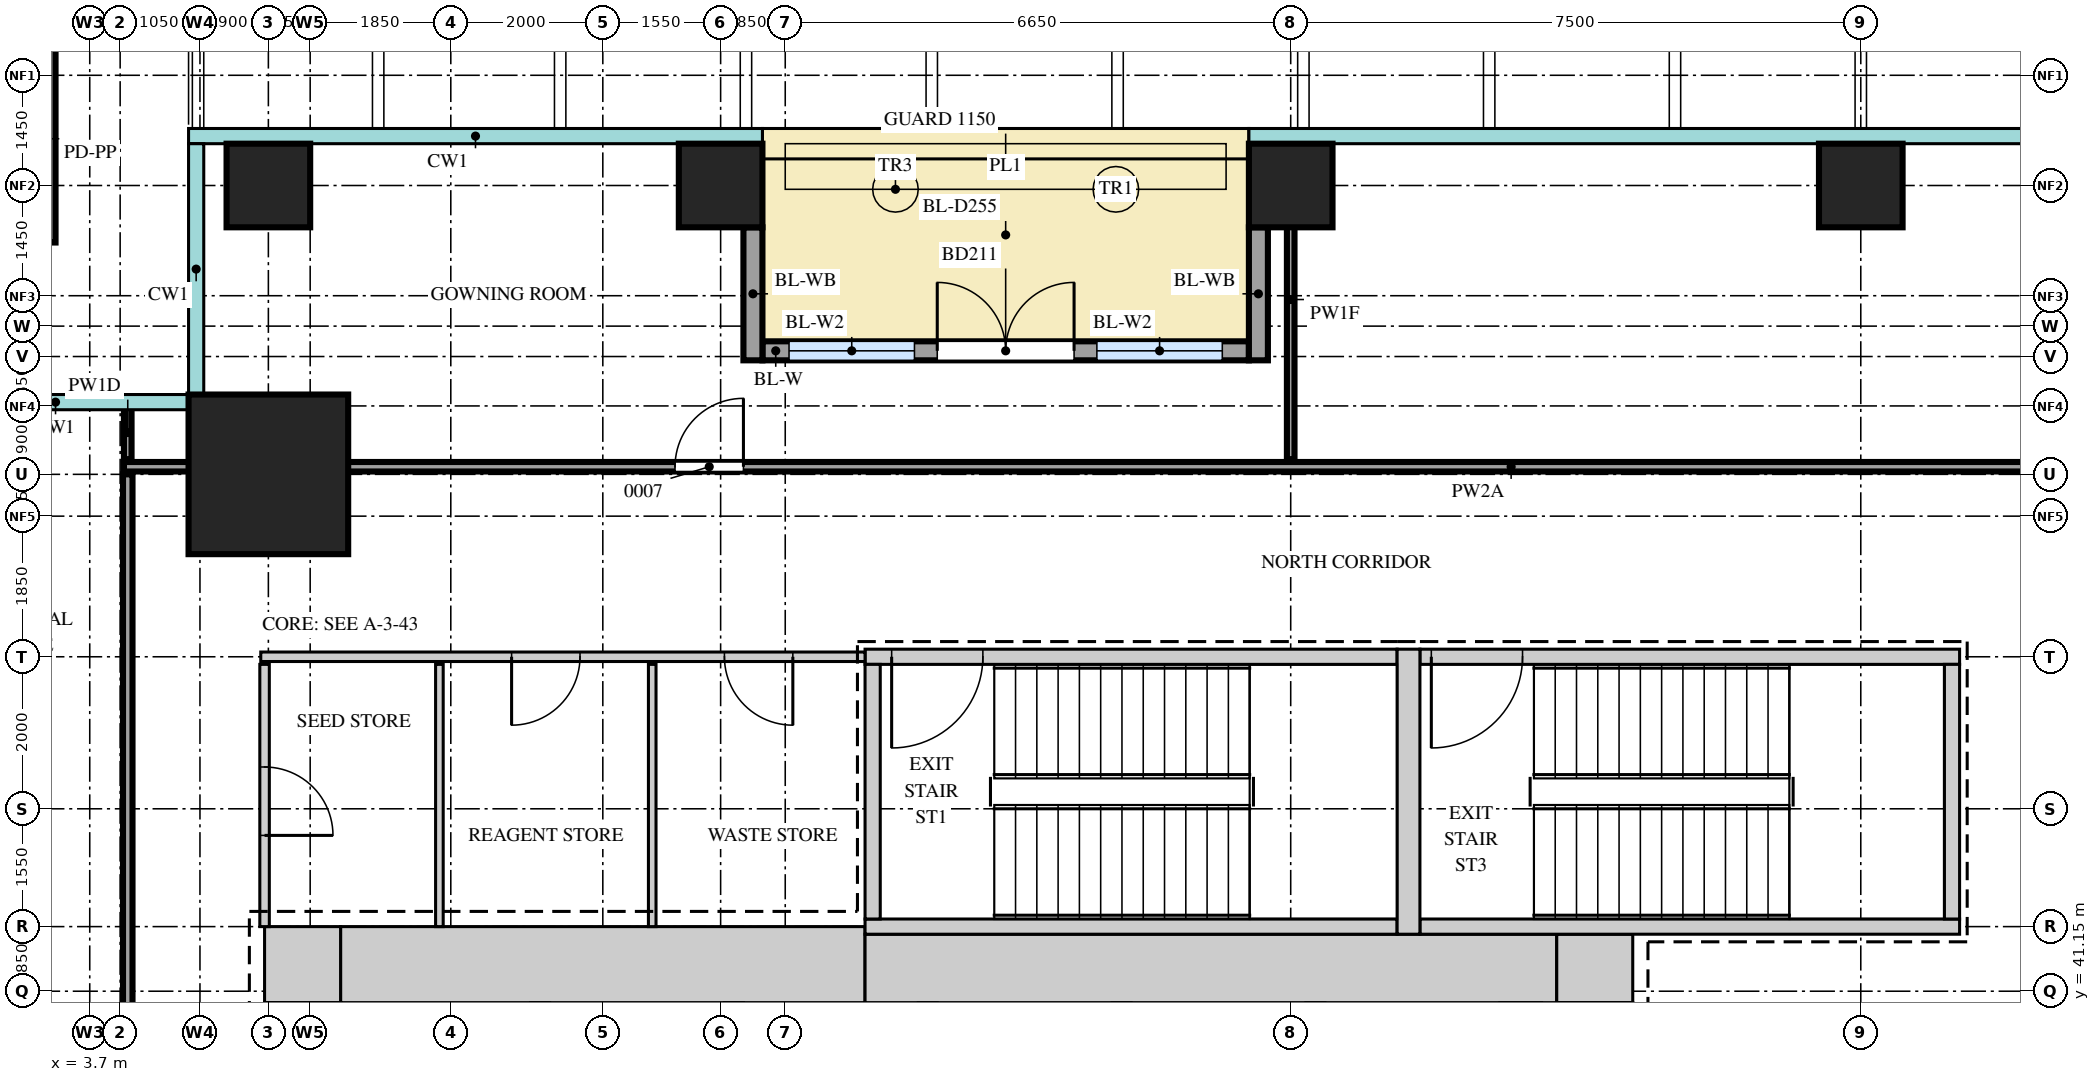
"""IFC4 building model, lengths in metres.
Left out: names, types, materials, properties, quantities, classifications, styles, units other than length and angle.
Written with IfcOpenShell. Run it as: python <this file> out.ifc"""

import sys

from ifc_helpers import new_model, si_unit, direction, frame, frame_2d, origin, origin_2d, place, context, subcontext, project, spatial, rectangle, extrude, source, transform, mapped, element, fill, save


model = new_model("IFC4")
c1 = context("Model", 3, precision=1e-05, world=origin(), true_north=direction((0.0, 1.0)))
c2 = subcontext(c1, "Body", "Model", "MODEL_VIEW")
j1 = project(units=[si_unit("LENGTHUNIT", "METRE"), si_unit("PLANEANGLEUNIT", "RADIAN")], contexts=[c1])
p1 = place(None, origin())
s1 = spatial("IfcSite", under=j1, at=p1, CompositionType="ELEMENT")
p2 = place(p1, origin())
s2 = spatial("IfcBuilding", under=s1, at=p2, CompositionType="ELEMENT")
p3 = place(p2, frame((0.0, 0.0, 101.5)))
s3 = spatial("IfcBuildingStorey", under=s2, at=p3, CompositionType="ELEMENT", Elevation=101.5)
m1 = source(origin(), c2, "Body", "SweptSolid", [
    extrude(rectangle(XDim=6.9, YDim=1.0, at=frame_2d((3.45, 0.0))), origin(), (0.0, 0.0, 1.0), 4.1),
])
p4 = place(p3, frame((7.0, 41.5, 0.0), z_axis=(0.0, 0.0, 1.0), x_axis=(1.0, 0.0, 0.0)))
e1 = element("IfcWall", 1, at=p4, inside=s3, PredefinedType="SHEAR", context=c2, shape_type="MappedRepresentation", body=[
    mapped(m1, transform((0.0, 0.0, 0.0))),
])
m2 = source(origin(), c2, "Body", "SweptSolid", [
    extrude(rectangle(XDim=9.1, YDim=0.9, at=frame_2d((4.55, 0.0))), origin(), (0.0, 0.0, 1.0), 4.1),
])
p5 = place(p3, frame((13.9, 41.45, 0.0), z_axis=(0.0, 0.0, 1.0), x_axis=(1.0, 0.0, 0.0)))
e2 = element("IfcWall", 2, at=p5, inside=s3, PredefinedType="SHEAR", context=c2, shape_type="MappedRepresentation", body=[
    mapped(m2, transform((0.0, 0.0, 0.0))),
])
m3 = source(origin(), c2, "Body", "SweptSolid", [
    extrude(rectangle(XDim=1.0, YDim=0.9, at=frame_2d((0.5, 0.0))), origin(), (0.0, 0.0, 1.0), 4.1),
])
p6 = place(p3, frame((23.0, 41.45, 0.0), z_axis=(0.0, 0.0, 1.0), x_axis=(1.0, 0.0, 0.0)))
e3 = element("IfcWall", 3, at=p6, inside=s3, PredefinedType="SHEAR", context=c2, shape_type="MappedRepresentation", body=[
    mapped(m3, transform((0.0, 0.0, 0.0))),
])
m4 = source(origin(), c2, "Body", "SweptSolid", [
    extrude(rectangle(XDim=1.0, YDim=1.0, at=frame_2d((0.5, 0.0))), origin(), (0.0, 0.0, 1.0), 4.1),
])
p7 = place(p3, frame((6.0, 41.5, 0.0), z_axis=(0.0, 0.0, 1.0), x_axis=(1.0, 0.0, 0.0)))
e4 = element("IfcWall", 4, at=p7, inside=s3, PredefinedType="SHEAR", context=c2, shape_type="MappedRepresentation", body=[
    mapped(m4, transform((0.0, 0.0, 0.0))),
])
m5 = source(origin(), c2, "Body", "SweptSolid", [
    extrude(rectangle(XDim=7.0, YDim=0.2, at=frame_2d((3.5, 0.0))), origin(), (0.0, 0.0, 1.0), 4.1),
])
p8 = place(p3, frame((13.9, 45.55, 0.0), z_axis=(0.0, 0.0, 1.0), x_axis=(1.0, 0.0, 0.0)))
e5 = element("IfcWall", 5, at=p8, inside=s3, PredefinedType="SHEAR", context=c2, shape_type="MappedRepresentation", body=[
    mapped(m5, transform((0.0, 0.0, 0.0))),
])
m6 = source(origin(), c2, "Body", "SweptSolid", [
    extrude(rectangle(XDim=1.2, YDim=2.1, at=frame_2d((0.6, 1.05))), frame((0.0, 0.11, 0.0), z_axis=(0.0, -1.0, 0.0), x_axis=(1.0, 0.0, 0.0)), (0.0, 0.0, 1.0), 0.22),
])
p9 = place(p8, frame((0.35, 0.0, 0.0)))
e6 = element("IfcOpeningElement", 6, at=p9, cuts=e5, PredefinedType="OPENING", context=c2, shape_type="MappedRepresentation", body=[
    mapped(m6, transform((0.0, 0.0, 0.0))),
])
p10 = place(p3, frame((13.9, 42.0, 0.0), z_axis=(0.0, 0.0, 1.0), x_axis=(1.0, 0.0, 0.0)))
e7 = element("IfcWall", 7, at=p10, inside=s3, PredefinedType="SHEAR", context=c2, shape_type="MappedRepresentation", body=[
    mapped(m5, transform((0.0, 0.0, 0.0))),
])
m7 = source(origin(), c2, "Body", "SweptSolid", [
    extrude(rectangle(XDim=7.1, YDim=0.2, at=frame_2d((3.55, 0.0))), origin(), (0.0, 0.0, 1.0), 4.1),
])
p11 = place(p3, frame((21.2, 45.55, 0.0), z_axis=(0.0, 0.0, 1.0), x_axis=(1.0, 0.0, 0.0)))
e8 = element("IfcWall", 8, at=p11, inside=s3, PredefinedType="SHEAR", context=c2, shape_type="MappedRepresentation", body=[
    mapped(m7, transform((0.0, 0.0, 0.0))),
])
p12 = place(p11, frame((0.15, 0.0, 0.0)))
e9 = element("IfcOpeningElement", 9, at=p12, cuts=e8, PredefinedType="OPENING", context=c2, shape_type="MappedRepresentation", body=[
    mapped(m6, transform((0.0, 0.0, 0.0))),
])
p13 = place(p3, frame((21.2, 42.0, 0.0), z_axis=(0.0, 0.0, 1.0), x_axis=(1.0, 0.0, 0.0)))
e10 = element("IfcWall", 10, at=p13, inside=s3, PredefinedType="SHEAR", context=c2, shape_type="MappedRepresentation", body=[
    mapped(m7, transform((0.0, 0.0, 0.0))),
])
m8 = source(origin(), c2, "Body", "SweptSolid", [
    extrude(rectangle(XDim=3.75, YDim=0.3, at=frame_2d((1.875, 0.0))), origin(), (0.0, 0.0, 1.0), 4.1),
])
p14 = place(p3, frame((21.05, 41.9, 0.0), z_axis=(0.0, 0.0, 1.0), x_axis=(0.0, 1.0, 0.0)))
e11 = element("IfcWall", 11, at=p14, inside=s3, PredefinedType="SHEAR", context=c2, shape_type="MappedRepresentation", body=[
    mapped(m8, transform((0.0, 0.0, 0.0))),
])
m9 = source(origin(), c2, "Body", "SweptSolid", [
    extrude(rectangle(XDim=3.35, YDim=0.2, at=frame_2d((1.675, 0.0))), origin(), (0.0, 0.0, 1.0), 4.1),
])
for number, where, z_axis, x_axis in (
    (12, (14.0, 42.1, 0.0), (0.0, 0.0, 1.0), (0.0, 1.0, 0.0)),
    (13, (28.2, 42.1, 0.0), (0.0, 0.0, 1.0), (0.0, 1.0, 0.0)),
):
    element("IfcWall", number, at=place(p3, frame(where, z_axis=z_axis, x_axis=x_axis)), inside=s3, PredefinedType="SHEAR", context=c2, shape_type="MappedRepresentation", body=[
        mapped(m9, transform((0.0, 0.0, 0.0))),
    ])
m10 = source(origin(), c2, "Body", "SweptSolid", [
    extrude(rectangle(XDim=2.1, YDim=2.1, at=origin_2d()), origin(), (0.0, 0.0, 1.0), 4.4),
])
p15 = place(p3, frame((6.05, 47.95, 0.0), z_axis=(0.0, 0.0, 1.0), x_axis=(1.0, 0.0, 0.0)))
e14 = element("IfcColumn", 14, at=p15, inside=s3, PredefinedType="COLUMN", context=c2, shape_type="MappedRepresentation", body=[
    mapped(m10, transform((0.0, 0.0, 0.0))),
])
m11 = source(origin(), c2, "Body", "SweptSolid", [
    extrude(rectangle(XDim=1.1, YDim=1.1, at=origin_2d()), origin(), (0.0, 0.0, 1.0), 4.1),
])
for number, where, z_axis, x_axis in (
    (15, (6.05, 51.75, 0.0), (0.0, 0.0, 1.0), (1.0, 0.0, 0.0)),
    (16, (12.0, 51.75, 0.0), (0.0, 0.0, 1.0), (1.0, 0.0, 0.0)),
    (17, (19.5, 51.75, 0.0), (0.0, 0.0, 1.0), (1.0, 0.0, 0.0)),
    (18, (27.0, 51.75, 0.0), (0.0, 0.0, 1.0), (1.0, 0.0, 0.0)),
):
    element("IfcColumn", number, at=place(p3, frame(where, z_axis=z_axis, x_axis=x_axis)), inside=s3, PredefinedType="COLUMN", context=c2, shape_type="MappedRepresentation", body=[
        mapped(m11, transform((0.0, 0.0, 0.0))),
    ])
m12 = source(origin(), c2, "Body", "SweptSolid", [
    extrude(rectangle(XDim=6.4, YDim=0.25, at=frame_2d((3.2, 0.0))), origin(), (0.0, 0.0, 1.0), 4.1),
])
p16 = place(p3, frame((12.55, 49.575, 0.0), z_axis=(0.0, 0.0, 1.0), x_axis=(1.0, 0.0, 0.0)))
e19 = element("IfcWall", 19, at=p16, inside=s3, PredefinedType="SOLIDWALL", context=c2, shape_type="MappedRepresentation", body=[
    mapped(m12, transform((0.0, 0.0, 0.0))),
])
m13 = source(origin(), c2, "Body", "SweptSolid", [
    extrude(rectangle(XDim=1.65, YDim=2.4, at=frame_2d((0.825, 1.2))), frame((0.0, 0.135, 0.0), z_axis=(0.0, -1.0, 0.0), x_axis=(1.0, 0.0, 0.0)), (0.0, 0.0, 1.0), 0.27),
])
p17 = place(p16, frame((0.35, 0.0, 0.0)))
e20 = element("IfcOpeningElement", 20, at=p17, cuts=e19, PredefinedType="OPENING", context=c2, shape_type="MappedRepresentation", body=[
    mapped(m13, transform((0.0, 0.0, 0.0))),
])
p18 = place(p16, frame((4.4, 0.0, 0.0)))
e21 = element("IfcOpeningElement", 21, at=p18, cuts=e19, PredefinedType="OPENING", context=c2, shape_type="MappedRepresentation", body=[
    mapped(m13, transform((0.0, 0.0, 0.0))),
])
m14 = source(origin(), c2, "Body", "SweptSolid", [
    extrude(rectangle(XDim=1.8, YDim=2.4, at=frame_2d((0.9, 1.2))), frame((0.0, 0.135, 0.0), z_axis=(0.0, -1.0, 0.0), x_axis=(1.0, 0.0, 0.0)), (0.0, 0.0, 1.0), 0.27),
])
p19 = place(p16, frame((2.3, 0.0, 0.0)))
e22 = element("IfcOpeningElement", 22, at=p19, cuts=e19, PredefinedType="OPENING", context=c2, shape_type="MappedRepresentation", body=[
    mapped(m14, transform((0.0, 0.0, 0.0))),
])
m15 = source(origin(), c2, "Body", "SweptSolid", [
    extrude(rectangle(XDim=1.75, YDim=0.25, at=frame_2d((0.875, 0.0))), origin(), (0.0, 0.0, 1.0), 3.8),
])
for number, where, z_axis, x_axis in (
    (23, (12.425, 51.2, 0.0), (0.0, 0.0, 1.0), (0.0, -1.0, 0.0)),
    (24, (19.075, 51.2, 0.0), (0.0, 0.0, 1.0), (0.0, -1.0, 0.0)),
):
    element("IfcWall", number, at=place(p3, frame(where, z_axis=z_axis, x_axis=x_axis)), inside=s3, PredefinedType="SOLIDWALL", context=c2, shape_type="MappedRepresentation", body=[
        mapped(m15, transform((0.0, 0.0, 0.0))),
    ])
m16 = source(origin(), c2, "Body", "SweptSolid", [
    extrude(rectangle(XDim=2.73, YDim=0.25, at=frame_2d((1.365, 0.0))), origin(), (0.0, 0.0, 1.0), 1.1),
])
p20 = place(p3, frame((3.125, 53.73, 0.0), z_axis=(0.0, 0.0, 1.0), x_axis=(0.0, -1.0, 0.0)))
e25 = element("IfcWall", 25, at=p20, inside=s3, PredefinedType="SOLIDWALL", context=c2, shape_type="MappedRepresentation", body=[
    mapped(m16, transform((0.0, 0.0, 0.0))),
])
m17 = source(origin(), c2, "Body", "SweptSolid", [
    extrude(rectangle(XDim=41.8, YDim=0.125, at=frame_2d((20.9, 0.0))), origin(), (0.0, 0.0, 1.0), 4.2),
])
p21 = place(p3, frame((4.2, 6.15, 0.0), z_axis=(0.0, 0.0, 1.0), x_axis=(0.0, 1.0, 0.0)))
e26 = element("IfcWall", 26, at=p21, inside=s3, PredefinedType="PARTITIONING", context=c2, shape_type="MappedRepresentation", body=[
    mapped(m17, transform((0.0, 0.0, 0.0))),
])
m18 = source(origin(), c2, "Body", "SweptSolid", [
    extrude(rectangle(XDim=0.9, YDim=2.1, at=frame_2d((0.45, 1.05))), frame((0.0, 0.073, 0.0), z_axis=(0.0, -1.0, 0.0), x_axis=(1.0, 0.0, 0.0)), (0.0, 0.0, 1.0), 0.145),
])
p22 = place(p21, frame((7.2, 0.0, 0.0)))
e27 = element("IfcOpeningElement", 27, at=p22, cuts=e26, PredefinedType="OPENING", context=c2, shape_type="MappedRepresentation", body=[
    mapped(m18, transform((0.0, 0.0, 0.0))),
])
p23 = place(p21, frame((21.8, 0.0, 0.0)))
e28 = element("IfcOpeningElement", 28, at=p23, cuts=e26, PredefinedType="OPENING", context=c2, shape_type="MappedRepresentation", body=[
    mapped(m18, transform((0.0, 0.0, 0.0))),
])
p24 = place(p21, frame((33.3, 0.0, 0.0)))
e29 = element("IfcOpeningElement", 29, at=p24, cuts=e26, PredefinedType="OPENING", context=c2, shape_type="MappedRepresentation", body=[
    mapped(m18, transform((0.0, 0.0, 0.0))),
])
m19 = source(origin(), c2, "Body", "SweptSolid", [
    extrude(rectangle(XDim=3.45, YDim=0.125, at=frame_2d((1.725, 0.0))), origin(), (0.0, 0.0, 1.0), 4.2),
])
p25 = place(p3, frame((6.0, 42.0, 0.0), z_axis=(0.0, 0.0, 1.0), x_axis=(0.0, 1.0, 0.0)))
e30 = element("IfcWall", 30, at=p25, inside=s3, PredefinedType="PARTITIONING", context=c2, shape_type="MappedRepresentation", body=[
    mapped(m19, transform((0.0, 0.0, 0.0))),
])
p26 = place(p25, frame((1.2, 0.0, 0.0)))
e31 = element("IfcOpeningElement", 31, at=p26, cuts=e30, PredefinedType="OPENING", context=c2, shape_type="MappedRepresentation", body=[
    mapped(m18, transform((0.0, 0.0, 0.0))),
])
m20 = source(origin(), c2, "Body", "SweptSolid", [
    extrude(rectangle(XDim=3.45, YDim=0.1, at=frame_2d((1.725, 0.0))), origin(), (0.0, 0.0, 1.0), 4.2),
])
for number, where, z_axis, x_axis in (
    (32, (8.3, 42.0, 0.0), (0.0, 0.0, 1.0), (0.0, 1.0, 0.0)),
    (33, (11.1, 42.0, 0.0), (0.0, 0.0, 1.0), (0.0, 1.0, 0.0)),
):
    element("IfcWall", number, at=place(p3, frame(where, z_axis=z_axis, x_axis=x_axis)), inside=s3, PredefinedType="PARTITIONING", context=c2, shape_type="MappedRepresentation", body=[
        mapped(m20, transform((0.0, 0.0, 0.0))),
    ])
m21 = source(origin(), c2, "Body", "SweptSolid", [
    extrude(rectangle(XDim=7.95, YDim=0.125, at=frame_2d((3.975, 0.0))), origin(), (0.0, 0.0, 1.0), 4.2),
])
p27 = place(p3, frame((5.95, 45.55, 0.0), z_axis=(0.0, 0.0, 1.0), x_axis=(1.0, 0.0, 0.0)))
e34 = element("IfcWall", 34, at=p27, inside=s3, PredefinedType="PARTITIONING", context=c2, shape_type="MappedRepresentation", body=[
    mapped(m21, transform((0.0, 0.0, 0.0))),
])
p28 = place(p27, frame((3.3, 0.0, 0.0)))
e35 = element("IfcOpeningElement", 35, at=p28, cuts=e34, PredefinedType="OPENING", context=c2, shape_type="MappedRepresentation", body=[
    mapped(m18, transform((0.0, 0.0, 0.0))),
])
p29 = place(p27, frame((6.1, 0.0, 0.0)))
e36 = element("IfcOpeningElement", 36, at=p29, cuts=e34, PredefinedType="OPENING", context=c2, shape_type="MappedRepresentation", body=[
    mapped(m18, transform((0.0, 0.0, 0.0))),
])
m22 = source(origin(), c2, "Body", "SweptSolid", [
    extrude(rectangle(XDim=42.2, YDim=0.125, at=frame_2d((21.1, 0.0))), origin(), (0.0, 0.0, 1.0), 3.55),
])
p30 = place(p3, frame((4.15, 48.05, 0.0), z_axis=(0.0, 0.0, 1.0), x_axis=(1.0, 0.0, 0.0)))
e37 = element("IfcWall", 37, at=p30, inside=s3, PredefinedType="PARTITIONING", context=c2, shape_type="MappedRepresentation", body=[
    mapped(m22, transform((0.0, 0.0, 0.0))),
])
p31 = place(p30, frame((7.25, 0.0, 0.0)))
e38 = element("IfcOpeningElement", 38, at=p31, cuts=e37, PredefinedType="OPENING", context=c2, shape_type="MappedRepresentation", body=[
    mapped(m18, transform((0.0, 0.0, 0.0))),
])
m23 = source(origin(), c2, "Body", "SweptSolid", [
    extrude(rectangle(XDim=1.2, YDim=2.1, at=frame_2d((0.6, 1.05))), frame((0.0, 0.073, 0.0), z_axis=(0.0, -1.0, 0.0), x_axis=(1.0, 0.0, 0.0)), (0.0, 0.0, 1.0), 0.145),
])
p32 = place(p30, frame((28.35, 0.0, 0.0)))
e39 = element("IfcOpeningElement", 39, at=p32, cuts=e37, PredefinedType="OPENING", context=c2, shape_type="MappedRepresentation", body=[
    mapped(m23, transform((0.0, 0.0, 0.0))),
])
m24 = source(origin(), c2, "Body", "SweptSolid", [
    extrude(rectangle(XDim=0.7, YDim=0.1, at=frame_2d((0.35, 0.0))), origin(), (0.0, 0.0, 1.0), 4.2),
])
p33 = place(p3, frame((4.2, 48.15, 0.0), z_axis=(0.0, 0.0, 1.0), x_axis=(0.0, 1.0, 0.0)))
e40 = element("IfcWall", 40, at=p33, inside=s3, PredefinedType="PARTITIONING", context=c2, shape_type="MappedRepresentation", body=[
    mapped(m24, transform((0.0, 0.0, 0.0))),
])
m25 = source(origin(), c2, "Body", "SweptSolid", [
    extrude(rectangle(XDim=4.2, YDim=0.1, at=frame_2d((2.1, 0.0))), origin(), (0.0, 0.0, 1.0), 3.77),
])
p34 = place(p3, frame((19.5, 48.15, 0.0), z_axis=(0.0, 0.0, 1.0), x_axis=(0.0, 1.0, 0.0)))
e41 = element("IfcWall", 41, at=p34, inside=s3, PredefinedType="PARTITIONING", context=c2, shape_type="MappedRepresentation", body=[
    mapped(m25, transform((0.0, 0.0, 0.0))),
])
m26 = source(origin(), c2, "Body", "SweptSolid", [
    extrude(rectangle(XDim=1.65, YDim=2.4, at=frame_2d((0.825, 1.2))), frame((0.0, 0.03, 0.0), z_axis=(0.0, -1.0, 0.0), x_axis=(1.0, 0.0, 0.0)), (0.0, 0.0, 1.0), 0.06),
])
p35 = place(p17, origin())
e42 = element("IfcWindow", 42, at=p35, inside=s3, PartitioningType="SINGLE_PANEL", PredefinedType="WINDOW", context=c2, shape_type="MappedRepresentation", body=[
    mapped(m26, transform((0.0, 0.0, 0.0))),
])
fill(e20, e42)
p36 = place(p18, origin())
e43 = element("IfcWindow", 43, at=p36, inside=s3, PartitioningType="SINGLE_PANEL", PredefinedType="WINDOW", context=c2, shape_type="MappedRepresentation", body=[
    mapped(m26, transform((0.0, 0.0, 0.0))),
])
fill(e21, e43)
m27 = source(origin(), c2, "Body", "SweptSolid", [
    extrude(rectangle(XDim=1.8, YDim=2.4, at=frame_2d((0.9, 1.2))), frame((0.0, 0.025, 0.0), z_axis=(0.0, -1.0, 0.0), x_axis=(1.0, 0.0, 0.0)), (0.0, 0.0, 1.0), 0.05),
])
p37 = place(p19, origin())
e44 = element("IfcDoor", 44, at=p37, inside=s3, OperationType="DOUBLE_DOOR_DOUBLE_SWING", PredefinedType="DOOR", context=c2, shape_type="MappedRepresentation", body=[
    mapped(m27, transform((0.0, 0.0, 0.0))),
])
fill(e22, e44)
m28 = source(origin(), c2, "Body", "SweptSolid", [
    extrude(rectangle(XDim=0.9, YDim=2.1, at=frame_2d((0.45, 1.05))), frame((0.0, 0.025, 0.0), z_axis=(0.0, -1.0, 0.0), x_axis=(1.0, 0.0, 0.0)), (0.0, 0.0, 1.0), 0.05),
])
p38 = place(p31, origin())
e45 = element("IfcDoor", 45, at=p38, inside=s3, OperationType="SINGLE_SWING_LEFT", PredefinedType="DOOR", context=c2, shape_type="MappedRepresentation", body=[
    mapped(m28, transform((0.0, 0.0, 0.0))),
])
fill(e38, e45)
p39 = place(p26, origin())
e46 = element("IfcDoor", 46, at=p39, inside=s3, OperationType="SINGLE_SWING_LEFT", PredefinedType="DOOR", context=c2, shape_type="MappedRepresentation", body=[
    mapped(m28, transform((0.0, 0.0, 0.0))),
])
fill(e31, e46)
p40 = place(p28, origin())
e47 = element("IfcDoor", 47, at=p40, inside=s3, OperationType="SINGLE_SWING_LEFT", PredefinedType="DOOR", context=c2, shape_type="MappedRepresentation", body=[
    mapped(m28, transform((0.0, 0.0, 0.0))),
])
fill(e35, e47)
p41 = place(p29, origin())
e48 = element("IfcDoor", 48, at=p41, inside=s3, OperationType="SINGLE_SWING_RIGHT", PredefinedType="DOOR", context=c2, shape_type="MappedRepresentation", body=[
    mapped(m28, transform((0.0, 0.0, 0.0))),
])
fill(e36, e48)
m29 = source(origin(), c2, "Body", "SweptSolid", [
    extrude(rectangle(XDim=1.2, YDim=2.1, at=frame_2d((0.6, 1.05))), frame((0.0, 0.025, 0.0), z_axis=(0.0, -1.0, 0.0), x_axis=(1.0, 0.0, 0.0)), (0.0, 0.0, 1.0), 0.05),
])
p42 = place(p9, origin())
e49 = element("IfcDoor", 49, at=p42, inside=s3, OperationType="SINGLE_SWING_LEFT", PredefinedType="DOOR", context=c2, shape_type="MappedRepresentation", body=[
    mapped(m29, transform((0.0, 0.0, 0.0))),
])
fill(e6, e49)
p43 = place(p12, origin())
e50 = element("IfcDoor", 50, at=p43, inside=s3, OperationType="SINGLE_SWING_LEFT", PredefinedType="DOOR", context=c2, shape_type="MappedRepresentation", body=[
    mapped(m29, transform((0.0, 0.0, 0.0))),
])
fill(e9, e50)
save(model, sys.argv[1])
